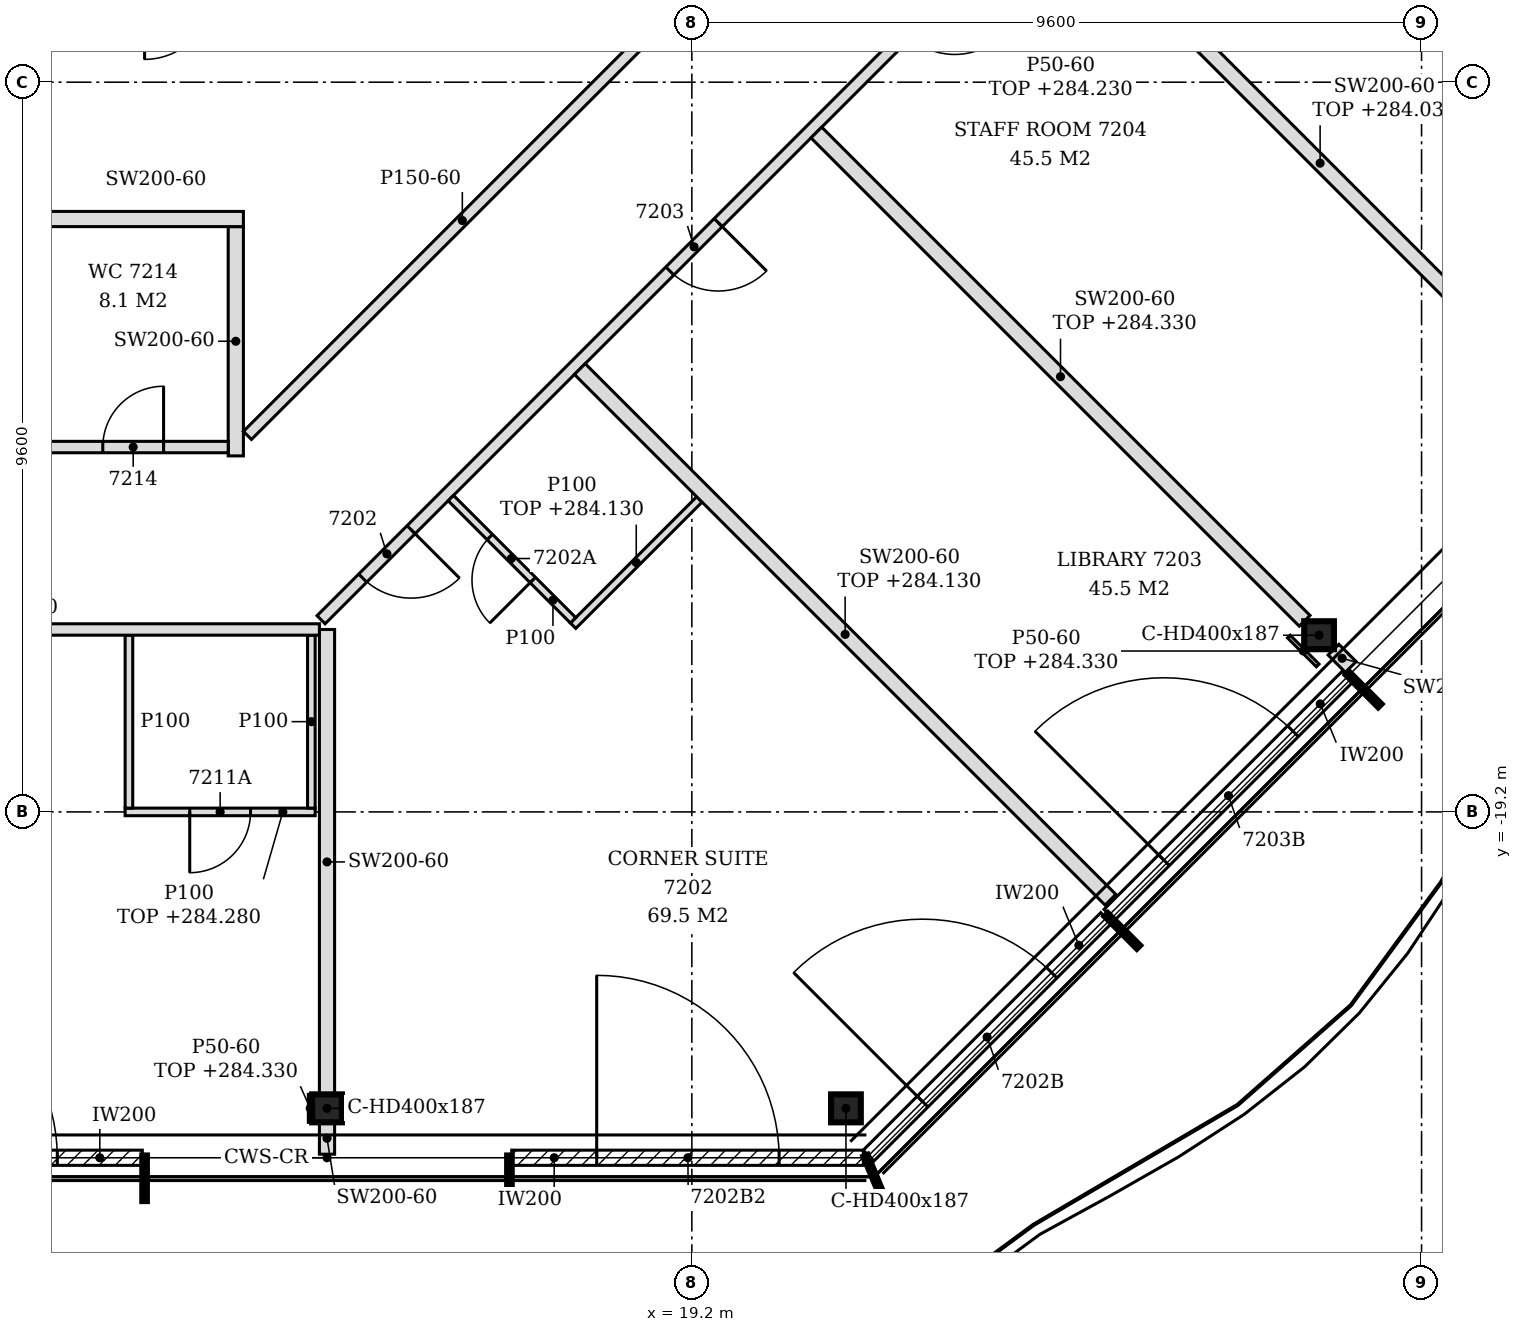
"""IFC4 building model, lengths in metres.
Left out: names, types, materials, properties, quantities, classifications, styles, units other than length and angle.
Written with IfcOpenShell. Run it as: python <this file> out.ifc"""

import sys

from ifc_helpers import new_model, si_unit, direction, frame, frame_2d, origin, origin_2d, place, context, subcontext, project, spatial, polyline, rectangle, i_section, outline, extrude, element, fill, save


model = new_model("IFC4")
c1 = context("Model", 3, precision=1e-05, world=origin(), true_north=direction((0.0, 1.0)))
c2 = subcontext(c1, "Body", "Model", "MODEL_VIEW")
j1 = project(units=[si_unit("LENGTHUNIT", "METRE"), si_unit("PLANEANGLEUNIT", "RADIAN")], contexts=[c1])
p1 = place(None, origin())
s1 = spatial("IfcSite", under=j1, at=p1, CompositionType="ELEMENT")
p2 = place(p1, origin())
s2 = spatial("IfcBuilding", under=s1, at=p2, CompositionType="ELEMENT")
p3 = place(p2, frame((0.0, 0.0, 281.4)))
s3 = spatial("IfcBuildingStorey", under=s2, at=p3, CompositionType="ELEMENT", Elevation=281.4)
for number, where, z_axis, x_axis in (
    (1, (14.4, -23.1, -0.15), (0.0, 0.0, 1.0), (1.0, 0.0, 0.0)),
    (2, (21.227, -23.1, -0.15), (0.0, 0.0, 1.0), (1.0, 0.0, 0.0)),
    (3, (27.451, -16.876, -0.15), (0.0, 0.0, 1.0), (1.0, 0.0, 0.0)),
):
    element("IfcColumn", number, at=place(p3, frame(where, z_axis=z_axis, x_axis=x_axis)), inside=s3, PredefinedType="COLUMN", context=c2, shape_type="SweptSolid", body=[
        extrude(i_section(OverallWidth=0.391, OverallDepth=0.368, WebThickness=0.015, FlangeThickness=0.024, FilletRadius=0.015, at=origin_2d()), origin(), (0.0, 0.0, 1.0), 3.6),
    ])
p4 = place(p3, frame((7.344, -23.75, 0.0), z_axis=(0.0, 0.0, 1.0), x_axis=(1.0, 0.0, 0.0)))
e4 = element("IfcWall", 4, at=p4, inside=s3, PredefinedType="NOTDEFINED", context=c2, shape_type="SweptSolid", body=[
    extrude(rectangle(XDim=4.626, YDim=0.2, at=frame_2d((2.313, 0.0))), origin(), (0.0, 0.0, 1.0), 3.45),
])
p5 = place(p4, frame((1.108, 0.0, 0.0)))
e5 = element("IfcOpeningElement", 5, at=p5, cuts=e4, PredefinedType="OPENING", context=c2, shape_type="SweptSolid", body=[
    extrude(rectangle(XDim=2.4, YDim=2.4, at=frame_2d((1.2, 1.2))), frame((0.0, 0.11, 0.0), z_axis=(0.0, -1.0, 0.0), x_axis=(1.0, 0.0, 0.0)), (0.0, 0.0, 1.0), 0.22),
])
p6 = place(p3, frame((16.83, -23.75, 0.0), z_axis=(0.0, 0.0, 1.0), x_axis=(1.0, 0.0, 0.0)))
e6 = element("IfcWall", 6, at=p6, inside=s3, PredefinedType="NOTDEFINED", context=c2, shape_type="SweptSolid", body=[
    extrude(rectangle(XDim=4.626, YDim=0.2, at=frame_2d((2.313, 0.0))), origin(), (0.0, 0.0, 1.0), 3.45),
])
p7 = place(p6, frame((1.118, 0.0, 0.0)))
e7 = element("IfcOpeningElement", 7, at=p7, cuts=e6, PredefinedType="OPENING", context=c2, shape_type="SweptSolid", body=[
    extrude(rectangle(XDim=2.4, YDim=2.4, at=frame_2d((1.2, 1.2))), frame((0.0, 0.11, 0.0), z_axis=(0.0, -1.0, 0.0), x_axis=(1.0, 0.0, 0.0)), (0.0, 0.0, 1.0), 0.22),
])
p8 = place(p3, frame((21.525, -23.722, 0.0), z_axis=(0.0, 0.0, 1.0), x_axis=(0.707134392299, 0.707079168996, 0.0)))
e8 = element("IfcWall", 8, at=p8, inside=s3, PredefinedType="NOTDEFINED", context=c2, shape_type="SweptSolid", body=[
    extrude(rectangle(XDim=4.421, YDim=0.2, at=frame_2d((2.21, 0.0))), origin(), (0.0, 0.0, 1.0), 3.45),
])
p9 = place(p8, frame((1.005, 0.0, 0.0)))
e9 = element("IfcOpeningElement", 9, at=p9, cuts=e8, PredefinedType="OPENING", context=c2, shape_type="SweptSolid", body=[
    extrude(rectangle(XDim=2.4, YDim=2.4, at=frame_2d((1.2, 1.2))), frame((0.0, 0.11, 0.0), z_axis=(0.0, -1.0, 0.0), x_axis=(1.0, 0.0, 0.0)), (0.0, 0.0, 1.0), 0.22),
])
p10 = place(p3, frame((24.693, -20.553, 0.0), z_axis=(0.0, 0.0, 1.0), x_axis=(0.707079231393, 0.707134329907, 0.0)))
e10 = element("IfcWall", 10, at=p10, inside=s3, PredefinedType="NOTDEFINED", context=c2, shape_type="SweptSolid", body=[
    extrude(rectangle(XDim=4.431, YDim=0.2, at=frame_2d((2.215, 0.0))), origin(), (0.0, 0.0, 1.0), 3.45),
])
p11 = place(p10, frame((1.015, 0.0, 0.0)))
e11 = element("IfcOpeningElement", 11, at=p11, cuts=e10, PredefinedType="OPENING", context=c2, shape_type="SweptSolid", body=[
    extrude(rectangle(XDim=2.4, YDim=2.4, at=frame_2d((1.2, 1.2))), frame((0.0, 0.11, 0.0), z_axis=(0.0, -1.0, 0.0), x_axis=(1.0, 0.0, 0.0)), (0.0, 0.0, 1.0), 0.22),
])
p12 = place(p3, frame((14.4, -23.703, 0.0), z_axis=(0.0, 0.0, 1.0), x_axis=(0.0, 1.0, 0.0)))
e12 = element("IfcWall", 12, at=p12, inside=s3, PredefinedType="PARTITIONING", context=c2, shape_type="SweptSolid", body=[
    extrude(rectangle(XDim=0.419, YDim=0.2, at=frame_2d((0.209, 0.0))), origin(), (0.0, 0.0, 1.0), 3.45),
])
p13 = place(p3, frame((14.4, -22.916, 0.0), z_axis=(0.0, 0.0, 1.0), x_axis=(0.0, 1.0, 0.0)))
e13 = element("IfcWall", 13, at=p13, inside=s3, PredefinedType="PARTITIONING", context=c2, shape_type="SweptSolid", body=[
    extrude(outline(polyline([(0.0, 0.0), (6.116, 0.0), (6.116, 3.45), (3.821, 3.45), (3.819, 2.88), (3.611, 2.88), (3.609, 3.45), (0.0, 3.45), (0.0, 0.0)])), frame((0.0, 0.1, 0.0), z_axis=(0.0, -1.0, 0.0), x_axis=(1.0, 0.0, 0.0)), (0.0, 0.0, 1.0), 0.2),
])
p14 = place(p3, frame((24.707, -20.355, 0.0), z_axis=(0.0, 0.0, 1.0), x_axis=(-0.707106781187, 0.707106781187, 0.0)))
e14 = element("IfcWall", 14, at=p14, inside=s3, PredefinedType="PARTITIONING", context=c2, shape_type="SweptSolid", body=[
    extrude(rectangle(XDim=9.873, YDim=0.2, at=frame_2d((4.937, 0.0))), origin(), (0.0, 0.0, 1.0), 2.73),
])
p15 = place(p3, frame((11.744, -19.2, 0.0), z_axis=(0.0, 0.0, 1.0), x_axis=(1.0, 0.0, 0.0)))
e15 = element("IfcWall", 15, at=p15, inside=s3, PredefinedType="PARTITIONING", context=c2, shape_type="SweptSolid", body=[
    extrude(rectangle(XDim=2.5, YDim=0.1, at=frame_2d((1.25, 0.0))), origin(), (0.0, 0.0, 1.0), 2.88),
])
p16 = place(p15, frame((0.85, 0.0, 0.0)))
e16 = element("IfcOpeningElement", 16, at=p16, cuts=e15, PredefinedType="OPENING", context=c2, shape_type="SweptSolid", body=[
    extrude(rectangle(XDim=0.8, YDim=2.1, at=frame_2d((0.4, 1.05))), frame((0.0, 0.06, 0.0), z_axis=(0.0, -1.0, 0.0), x_axis=(1.0, 0.0, 0.0)), (0.0, 0.0, 1.0), 0.12),
])
for number, where, z_axis, x_axis in (
    (17, (11.794, -19.15, 0.0), (0.0, 0.0, 1.0), (0.0, 1.0, 0.0)),
    (18, (14.194, -19.15, 0.0), (0.0, 0.0, 1.0), (0.0, 1.0, 0.0)),
):
    element("IfcWall", number, at=place(p3, frame(where, z_axis=z_axis, x_axis=x_axis)), inside=s3, PredefinedType="PARTITIONING", context=c2, shape_type="SweptSolid", body=[
        extrude(outline(polyline([(0.0, 0.0), (2.275, 0.0), (2.275, 3.45), (0.055, 3.45), (0.053, 2.88), (0.0, 2.88), (0.0, 0.0)])), frame((0.0, 0.05, 0.0), z_axis=(0.0, -1.0, 0.0), x_axis=(1.0, 0.0, 0.0)), (0.0, 0.0, 1.0), 0.1),
    ])
p17 = place(p3, frame((27.869, -17.293, 0.0), z_axis=(0.0, 0.0, 1.0), x_axis=(-0.707106781187, 0.707106781187, 0.0)))
e19 = element("IfcWall", 19, at=p17, inside=s3, PredefinedType="PARTITIONING", context=c2, shape_type="SweptSolid", body=[
    extrude(rectangle(XDim=0.322, YDim=0.2, at=frame_2d((0.161, 0.0))), origin(), (0.0, 0.0, 1.0), 3.45),
])
p18 = place(p3, frame((1.544, -16.8, 0.0), z_axis=(0.0, 0.0, 1.0), x_axis=(1.0, 0.0, 0.0)))
e20 = element("IfcWall", 20, at=p18, inside=s3, PredefinedType="PARTITIONING", context=c2, shape_type="SweptSolid", body=[
    extrude(outline(polyline([(0.0, 0.0), (12.756, 0.0), (12.756, 3.45), (5.806, 3.45), (5.804, 2.73), (5.506, 2.73), (5.504, 3.45), (0.0, 3.45), (0.0, 0.0)])), frame((0.0, 0.075, 0.0), z_axis=(0.0, -1.0, 0.0), x_axis=(1.0, 0.0, 0.0)), (0.0, 0.0, 1.0), 0.15),
])
p19 = place(p18, frame((3.903, 0.0, 0.0)))
e21 = element("IfcOpeningElement", 21, at=p19, cuts=e20, PredefinedType="OPENING", context=c2, shape_type="SweptSolid", body=[
    extrude(rectangle(XDim=0.9, YDim=2.1, at=frame_2d((0.45, 1.05))), frame((0.0, 0.085, 0.0), z_axis=(0.0, -1.0, 0.0), x_axis=(1.0, 0.0, 0.0)), (0.0, 0.0, 1.0), 0.17),
])
p20 = place(p3, frame((17.638, -16.75, 0.0), z_axis=(0.0, 0.0, 1.0), x_axis=(0.707054835785, 0.707158722772, 0.0)))
e22 = element("IfcWall", 22, at=p20, inside=s3, PredefinedType="PARTITIONING", context=c2, shape_type="SweptSolid", body=[
    extrude(rectangle(XDim=2.35, YDim=0.1, at=frame_2d((1.175, 0.0))), origin(), (0.0, 0.0, 1.0), 2.73),
])
p21 = place(p3, frame((14.322, -16.672, 0.0), z_axis=(0.0, 0.0, 1.0), x_axis=(0.707106781187, 0.707106781187, 0.0)))
e23 = element("IfcWall", 23, at=p21, inside=s3, PredefinedType="PARTITIONING", context=c2, shape_type="SweptSolid", body=[
    extrude(rectangle(XDim=23.452, YDim=0.15, at=frame_2d((11.726, 0.0))), origin(), (0.0, 0.0, 1.0), 2.73),
])
p22 = place(p21, frame((0.775, 0.0, 0.0)))
e24 = element("IfcOpeningElement", 24, at=p22, cuts=e23, PredefinedType="OPENING", context=c2, shape_type="SweptSolid", body=[
    extrude(rectangle(XDim=0.9, YDim=2.1, at=frame_2d((0.45, 1.05))), frame((0.0, 0.085, 0.0), z_axis=(0.0, -1.0, 0.0), x_axis=(1.0, 0.0, 0.0)), (0.0, 0.0, 1.0), 0.17),
])
p23 = place(p21, frame((6.489, 0.0, 0.0)))
e25 = element("IfcOpeningElement", 25, at=p23, cuts=e23, PredefinedType="OPENING", context=c2, shape_type="SweptSolid", body=[
    extrude(rectangle(XDim=0.9, YDim=2.1, at=frame_2d((0.45, 1.05))), frame((0.0, 0.085, 0.0), z_axis=(0.0, -1.0, 0.0), x_axis=(1.0, 0.0, 0.0)), (0.0, 0.0, 1.0), 0.17),
])
p24 = place(p21, frame((10.89, 0.0, 0.0)))
e26 = element("IfcOpeningElement", 26, at=p24, cuts=e23, PredefinedType="OPENING", context=c2, shape_type="SweptSolid", body=[
    extrude(rectangle(XDim=0.9, YDim=2.1, at=frame_2d((0.45, 1.05))), frame((0.0, 0.085, 0.0), z_axis=(0.0, -1.0, 0.0), x_axis=(1.0, 0.0, 0.0)), (0.0, 0.0, 1.0), 0.17),
])
p25 = place(p21, frame((14.788, 0.0, 0.0)))
e27 = element("IfcOpeningElement", 27, at=p25, cuts=e23, PredefinedType="OPENING", context=c2, shape_type="SweptSolid", body=[
    extrude(rectangle(XDim=0.9, YDim=2.1, at=frame_2d((0.45, 1.05))), frame((0.0, 0.085, 0.0), z_axis=(0.0, -1.0, 0.0), x_axis=(1.0, 0.0, 0.0)), (0.0, 0.0, 1.0), 0.17),
])
p26 = place(p21, frame((17.689, 0.0, 0.0)))
e28 = element("IfcOpeningElement", 28, at=p26, cuts=e23, PredefinedType="OPENING", context=c2, shape_type="SweptSolid", body=[
    extrude(rectangle(XDim=0.9, YDim=2.1, at=frame_2d((0.45, 1.05))), frame((0.0, 0.085, 0.0), z_axis=(0.0, -1.0, 0.0), x_axis=(1.0, 0.0, 0.0)), (0.0, 0.0, 1.0), 0.17),
])
p27 = place(p3, frame((17.638, -16.68, 0.0), z_axis=(0.0, 0.0, 1.0), x_axis=(-0.707106781187, 0.707106781187, 0.0)))
e29 = element("IfcWall", 29, at=p27, inside=s3, PredefinedType="PARTITIONING", context=c2, shape_type="SweptSolid", body=[
    extrude(rectangle(XDim=2.275, YDim=0.1, at=frame_2d((1.137, 0.0))), origin(), (0.0, 0.0, 1.0), 3.45),
])
p28 = place(p27, frame((0.75, 0.0, 0.0)))
e30 = element("IfcOpeningElement", 30, at=p28, cuts=e29, PredefinedType="OPENING", context=c2, shape_type="SweptSolid", body=[
    extrude(rectangle(XDim=0.8, YDim=2.1, at=frame_2d((0.4, 1.05))), frame((0.0, 0.06, 0.0), z_axis=(0.0, -1.0, 0.0), x_axis=(1.0, 0.0, 0.0)), (0.0, 0.0, 1.0), 0.12),
])
p29 = place(p3, frame((27.262, -16.686, 0.0), z_axis=(0.0, 0.0, 1.0), x_axis=(-0.707106781187, 0.707106781187, 0.0)))
e31 = element("IfcWall", 31, at=p29, inside=s3, PredefinedType="PARTITIONING", context=c2, shape_type="SweptSolid", body=[
    extrude(rectangle(XDim=9.085, YDim=0.2, at=frame_2d((4.542, 0.0))), origin(), (0.0, 0.0, 1.0), 2.93),
])
p30 = place(p3, frame((13.2, -14.516, 0.0), z_axis=(0.0, 0.0, 1.0), x_axis=(0.0, 1.0, 0.0)))
e32 = element("IfcWall", 32, at=p30, inside=s3, PredefinedType="PARTITIONING", context=c2, shape_type="SweptSolid", body=[
    extrude(outline(polyline([(0.0, 0.0), (3.016, 0.0), (3.016, 3.45), (0.221, 3.45), (0.219, 2.88), (0.011, 2.88), (0.01, 3.45), (0.0, 3.45), (0.0, 0.0)])), frame((0.0, 0.1, 0.0), z_axis=(0.0, -1.0, 0.0), x_axis=(1.0, 0.0, 0.0)), (0.0, 0.0, 1.0), 0.2),
])
p31 = place(p3, frame((2.325, -14.4, 0.0), z_axis=(0.0, 0.0, 1.0), x_axis=(1.0, 0.0, 0.0)))
e33 = element("IfcWall", 33, at=p31, inside=s3, PredefinedType="PARTITIONING", context=c2, shape_type="SweptSolid", body=[
    extrude(outline(polyline([(0.0, 0.0), (10.775, 0.0), (10.775, 2.88), (5.025, 2.88), (5.023, 2.73), (4.725, 2.73), (4.723, 2.88), (0.0, 2.88), (0.0, 0.0)])), frame((0.0, 0.075, 0.0), z_axis=(0.0, -1.0, 0.0), x_axis=(1.0, 0.0, 0.0)), (0.0, 0.0, 1.0), 0.15),
])
p32 = place(p31, frame((9.125, 0.0, 0.0)))
e34 = element("IfcOpeningElement", 34, at=p32, cuts=e33, PredefinedType="OPENING", context=c2, shape_type="SweptSolid", body=[
    extrude(rectangle(XDim=0.8, YDim=2.1, at=frame_2d((0.4, 1.05))), frame((0.0, 0.085, 0.0), z_axis=(0.0, -1.0, 0.0), x_axis=(1.0, 0.0, 0.0)), (0.0, 0.0, 1.0), 0.17),
])
p33 = place(p3, frame((13.353, -14.247, 0.0), z_axis=(0.0, 0.0, 1.0), x_axis=(0.707106781187, 0.707106781187, 0.0)))
e35 = element("IfcWall", 35, at=p33, inside=s3, PredefinedType="PARTITIONING", context=c2, shape_type="SweptSolid", body=[
    extrude(rectangle(XDim=7.997, YDim=0.15, at=frame_2d((3.999, 0.0))), origin(), (0.0, 0.0, 1.0), 3.45),
])
p34 = place(p3, frame((30.981, -14.181, 0.0), z_axis=(0.0, 0.0, 1.0), x_axis=(-0.707094504281, 0.707119057879, 0.0)))
e36 = element("IfcWall", 36, at=p34, inside=s3, PredefinedType="PARTITIONING", context=c2, shape_type="SweptSolid", body=[
    extrude(rectangle(XDim=9.943, YDim=0.2, at=frame_2d((4.972, 0.0))), origin(), (0.0, 0.0, 1.0), 2.63),
])
p35 = place(p3, frame((10.4, -11.4, 0.0), z_axis=(0.0, 0.0, 1.0), x_axis=(1.0, 0.0, 0.0)))
e37 = element("IfcWall", 37, at=p35, inside=s3, PredefinedType="PARTITIONING", context=c2, shape_type="SweptSolid", body=[
    extrude(rectangle(XDim=2.9, YDim=0.2, at=frame_2d((1.45, 0.0))), origin(), (0.0, 0.0, 1.0), 3.45),
])
p36 = place(p3, frame((31.008, -9.408, 0.0), z_axis=(0.0, 0.0, 1.0), x_axis=(-0.707106781187, 0.707106781187, 0.0)))
e38 = element("IfcWall", 38, at=p36, inside=s3, PredefinedType="PARTITIONING", context=c2, shape_type="SweptSolid", body=[
    extrude(rectangle(XDim=6.587, YDim=0.2, at=frame_2d((3.293, 0.0))), origin(), (0.0, 0.0, 1.0), 2.88),
])
p37 = place(p3, frame((14.179, -23.284, 0.0), z_axis=(0.0, 0.0, 1.0), x_axis=(0.0, 1.0, 0.0)))
e39 = element("IfcWall", 39, at=p37, inside=s3, PredefinedType="PARTITIONING", context=c2, shape_type="SweptSolid", body=[
    extrude(rectangle(XDim=0.368, YDim=0.05, at=frame_2d((0.184, 0.0))), origin(), (0.0, 0.0, 1.0), 2.93),
])
p38 = place(p3, frame((27.434, -17.273, 0.0), z_axis=(0.0, 0.0, 1.0), x_axis=(-0.707106781187, 0.707106781187, 0.0)))
e40 = element("IfcWall", 40, at=p38, inside=s3, PredefinedType="PARTITIONING", context=c2, shape_type="SweptSolid", body=[
    extrude(rectangle(XDim=0.537, YDim=0.05, at=frame_2d((0.269, 0.0))), origin(), (0.0, 0.0, 1.0), 2.93),
])
p39 = place(p5, origin())
e41 = element("IfcDoor", 41, at=p39, inside=s3, OperationType="SINGLE_SWING_LEFT", PredefinedType="DOOR", context=c2, shape_type="SweptSolid", body=[
    extrude(rectangle(XDim=2.4, YDim=2.4, at=frame_2d((1.2, 1.2))), frame((0.0, 0.025, 0.0), z_axis=(0.0, -1.0, 0.0), x_axis=(1.0, 0.0, 0.0)), (0.0, 0.0, 1.0), 0.05),
])
fill(e5, e41)
p40 = place(p7, origin())
e42 = element("IfcDoor", 42, at=p40, inside=s3, OperationType="SINGLE_SWING_LEFT", PredefinedType="DOOR", context=c2, shape_type="SweptSolid", body=[
    extrude(rectangle(XDim=2.4, YDim=2.4, at=frame_2d((1.2, 1.2))), frame((0.0, 0.025, 0.0), z_axis=(0.0, -1.0, 0.0), x_axis=(1.0, 0.0, 0.0)), (0.0, 0.0, 1.0), 0.05),
])
fill(e7, e42)
p41 = place(p9, origin())
e43 = element("IfcDoor", 43, at=p41, inside=s3, OperationType="SINGLE_SWING_LEFT", PredefinedType="DOOR", context=c2, shape_type="SweptSolid", body=[
    extrude(rectangle(XDim=2.4, YDim=2.4, at=frame_2d((1.2, 1.2))), frame((0.0, 0.025, 0.0), z_axis=(0.0, -1.0, 0.0), x_axis=(1.0, 0.0, 0.0)), (0.0, 0.0, 1.0), 0.05),
])
fill(e9, e43)
p42 = place(p11, origin())
e44 = element("IfcDoor", 44, at=p42, inside=s3, OperationType="SINGLE_SWING_LEFT", PredefinedType="DOOR", context=c2, shape_type="SweptSolid", body=[
    extrude(rectangle(XDim=2.4, YDim=2.4, at=frame_2d((1.2, 1.2))), frame((0.0, 0.025, 0.0), z_axis=(0.0, -1.0, 0.0), x_axis=(1.0, 0.0, 0.0)), (0.0, 0.0, 1.0), 0.05),
])
fill(e11, e44)
p43 = place(p22, frame((0.9, 0.0, 0.0), z_axis=(0.0, 0.0, 1.0), x_axis=(-1.0, 0.0, 0.0)))
e45 = element("IfcDoor", 45, at=p43, inside=s3, OperationType="SINGLE_SWING_LEFT", PredefinedType="DOOR", context=c2, shape_type="SweptSolid", body=[
    extrude(rectangle(XDim=0.9, YDim=2.1, at=frame_2d((0.45, 1.05))), frame((0.0, 0.025, 0.0), z_axis=(0.0, -1.0, 0.0), x_axis=(1.0, 0.0, 0.0)), (0.0, 0.0, 1.0), 0.05),
])
fill(e24, e45)
p44 = place(p28, origin())
e46 = element("IfcDoor", 46, at=p44, inside=s3, OperationType="SINGLE_SWING_LEFT", PredefinedType="DOOR", context=c2, shape_type="SweptSolid", body=[
    extrude(rectangle(XDim=0.8, YDim=2.1, at=frame_2d((0.4, 1.05))), frame((0.0, 0.025, 0.0), z_axis=(0.0, -1.0, 0.0), x_axis=(1.0, 0.0, 0.0)), (0.0, 0.0, 1.0), 0.05),
])
fill(e30, e46)
p45 = place(p23, frame((0.9, 0.0, 0.0), z_axis=(0.0, 0.0, 1.0), x_axis=(-1.0, 0.0, 0.0)))
e47 = element("IfcDoor", 47, at=p45, inside=s3, OperationType="SINGLE_SWING_LEFT", PredefinedType="DOOR", context=c2, shape_type="SweptSolid", body=[
    extrude(rectangle(XDim=0.9, YDim=2.1, at=frame_2d((0.45, 1.05))), frame((0.0, 0.025, 0.0), z_axis=(0.0, -1.0, 0.0), x_axis=(1.0, 0.0, 0.0)), (0.0, 0.0, 1.0), 0.05),
])
fill(e25, e47)
p46 = place(p16, frame((0.8, 0.0, 0.0), z_axis=(0.0, 0.0, 1.0), x_axis=(-1.0, 0.0, 0.0)))
e48 = element("IfcDoor", 48, at=p46, inside=s3, OperationType="SINGLE_SWING_RIGHT", PredefinedType="DOOR", context=c2, shape_type="SweptSolid", body=[
    extrude(rectangle(XDim=0.8, YDim=2.1, at=frame_2d((0.4, 1.05))), frame((0.0, 0.025, 0.0), z_axis=(0.0, -1.0, 0.0), x_axis=(1.0, 0.0, 0.0)), (0.0, 0.0, 1.0), 0.05),
])
fill(e16, e48)
p47 = place(p32, origin())
e49 = element("IfcDoor", 49, at=p47, inside=s3, OperationType="SINGLE_SWING_RIGHT", PredefinedType="DOOR", context=c2, shape_type="SweptSolid", body=[
    extrude(rectangle(XDim=0.8, YDim=2.1, at=frame_2d((0.4, 1.05))), frame((0.0, 0.025, 0.0), z_axis=(0.0, -1.0, 0.0), x_axis=(1.0, 0.0, 0.0)), (0.0, 0.0, 1.0), 0.05),
])
fill(e34, e49)
save(model, sys.argv[1])
